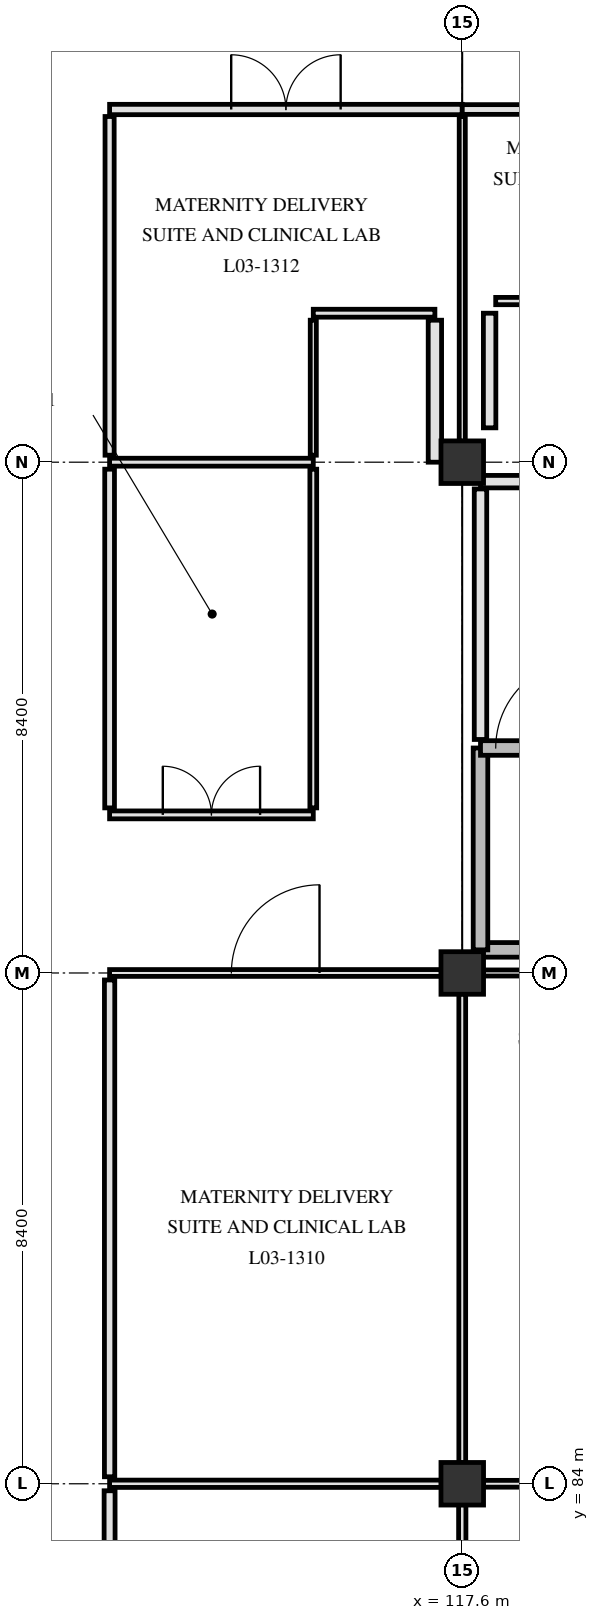
"""IFC4 building model, lengths in metres.
Left out: names, types, materials, properties, quantities, classifications, styles, units other than length and angle.
Written with IfcOpenShell. Run it as: python <this file> out.ifc"""

import sys

from ifc_helpers import new_model, si_unit, direction, frame, frame_2d, origin, origin_2d, place, context, subcontext, project, spatial, rectangle, extrude, element, fill, save


model = new_model("IFC4")
c1 = context("Model", 3, precision=1e-05, world=origin(), true_north=direction((0.0, 1.0)))
c2 = subcontext(c1, "Body", "Model", "MODEL_VIEW")
j1 = project(units=[si_unit("LENGTHUNIT", "METRE"), si_unit("PLANEANGLEUNIT", "RADIAN")], contexts=[c1])
p1 = place(None, origin())
s1 = spatial("IfcSite", under=j1, at=p1, CompositionType="ELEMENT")
p2 = place(p1, origin())
s2 = spatial("IfcBuilding", under=s1, at=p2, CompositionType="ELEMENT")
p3 = place(p2, frame((0.0, 0.0, 14.4)))
s3 = spatial("IfcBuildingStorey", under=s2, at=p3, CompositionType="ELEMENT", Elevation=14.4)
for number, where, z_axis, x_axis in (
    (1, (117.6, 84.0, 0.0), (0.0, 0.0, 1.0), (1.0, 0.0, 0.0)),
    (2, (117.6, 92.4, 0.0), (0.0, 0.0, 1.0), (1.0, 0.0, 0.0)),
    (3, (117.6, 100.8, 0.0), (0.0, 0.0, 1.0), (1.0, 0.0, 0.0)),
):
    element("IfcColumn", number, at=place(p3, frame(where, z_axis=z_axis, x_axis=x_axis)), inside=s3, PredefinedType="COLUMN", context=c2, shape_type="SweptSolid", body=[
        extrude(rectangle(XDim=0.7, YDim=0.7, at=origin_2d()), origin(), (0.0, 0.0, 1.0), 4.2),
    ])
p4 = place(p3, frame((117.9, 92.78, 0.0), z_axis=(0.0, 0.0, 1.0), x_axis=(1.0, 0.0, 0.0)))
e4 = element("IfcWall", 4, at=p4, inside=s3, PredefinedType="SHEAR", context=c2, shape_type="SweptSolid", body=[
    extrude(rectangle(XDim=7.82, YDim=0.24, at=frame_2d((3.91, 0.0))), origin(), (0.0, 0.0, 1.0), 3.9),
])
p5 = place(p3, frame((117.9, 92.78, 0.0), z_axis=(0.0, 0.0, 1.0), x_axis=(0.0, 1.0, 0.0)))
e5 = element("IfcWall", 5, at=p5, inside=s3, PredefinedType="SHEAR", context=c2, shape_type="SweptSolid", body=[
    extrude(rectangle(XDim=3.32, YDim=0.24, at=frame_2d((1.66, 0.0))), origin(), (0.0, 0.0, 1.0), 3.9),
])
p6 = place(p3, frame((117.9, 96.1, 0.0), z_axis=(0.0, 0.0, 1.0), x_axis=(1.0, 0.0, 0.0)))
e6 = element("IfcWall", 6, at=p6, inside=s3, PredefinedType="SHEAR", context=c2, shape_type="SweptSolid", body=[
    extrude(rectangle(XDim=7.82, YDim=0.24, at=frame_2d((3.91, 0.0))), origin(), (0.0, 0.0, 1.0), 3.9),
])
p7 = place(p6, frame((0.25, 0.0, 0.0)))
e7 = element("IfcOpeningElement", 7, at=p7, cuts=e6, PredefinedType="OPENING", context=c2, shape_type="SweptSolid", body=[
    extrude(rectangle(XDim=1.45, YDim=2.2, at=frame_2d((0.725, 1.1))), frame((0.0, 0.13, 0.0), z_axis=(0.0, -1.0, 0.0), x_axis=(1.0, 0.0, 0.0)), (0.0, 0.0, 1.0), 0.26),
])
p8 = place(p3, frame((117.9, 96.24, 0.0), z_axis=(0.0, 0.0, 1.0), x_axis=(0.0, 1.0, 0.0)))
e8 = element("IfcWall", 8, at=p8, inside=s3, PredefinedType="PARTITIONING", context=c2, shape_type="SweptSolid", body=[
    extrude(rectangle(XDim=4.12, YDim=0.205, at=frame_2d((2.06, 0.0))), origin(), (0.0, 0.0, 1.0), 3.34),
])
p9 = place(p3, frame((117.9, 100.48, 0.0), z_axis=(0.0, 0.0, 1.0), x_axis=(1.0, 0.0, 0.0)))
e9 = element("IfcWall", 9, at=p9, inside=s3, PredefinedType="PARTITIONING", context=c2, shape_type="SweptSolid", body=[
    extrude(rectangle(XDim=4.18, YDim=0.205, at=frame_2d((2.09, 0.0))), origin(), (0.0, 0.0, 1.0), 3.29),
])
p10 = place(p9, frame((1.29, 0.0, 0.0)))
e10 = element("IfcOpeningElement", 10, at=p10, cuts=e9, PredefinedType="OPENING", context=c2, shape_type="SweptSolid", body=[
    extrude(rectangle(XDim=1.6, YDim=2.25, at=frame_2d((0.8, 1.125))), frame((0.0, 0.113, 0.0), z_axis=(0.0, -1.0, 0.0), x_axis=(1.0, 0.0, 0.0)), (0.0, 0.0, 1.0), 0.225),
])
p11 = place(p3, frame((111.8, 84.0, 0.0), z_axis=(0.0, 0.0, 1.0), x_axis=(1.0, 0.0, 0.0)))
e11 = element("IfcWall", 11, at=p11, inside=s3, PredefinedType="PARTITIONING", context=c2, shape_type="SweptSolid", body=[
    extrude(rectangle(XDim=5.455, YDim=0.12, at=frame_2d((2.728, 0.0))), origin(), (0.0, 0.0, 1.0), 3.29),
])
p12 = place(p3, frame((117.945, 84.0, 0.0), z_axis=(0.0, 0.0, 1.0), x_axis=(1.0, 0.0, 0.0)))
e12 = element("IfcWall", 12, at=p12, inside=s3, PredefinedType="PARTITIONING", context=c2, shape_type="SweptSolid", body=[
    extrude(rectangle(XDim=5.605, YDim=0.112, at=frame_2d((2.802, 0.0))), origin(), (0.0, 0.0, 1.0), 3.29),
])
p13 = place(p3, frame((111.8, 92.4, 0.0), z_axis=(0.0, 0.0, 1.0), x_axis=(1.0, 0.0, 0.0)))
e13 = element("IfcWall", 13, at=p13, inside=s3, PredefinedType="PARTITIONING", context=c2, shape_type="SweptSolid", body=[
    extrude(rectangle(XDim=5.455, YDim=0.112, at=frame_2d((2.728, 0.0))), origin(), (0.0, 0.0, 1.0), 2.89),
])
p14 = place(p13, frame((2.002, 0.0, 0.0)))
e14 = element("IfcOpeningElement", 14, at=p14, cuts=e13, PredefinedType="OPENING", context=c2, shape_type="SweptSolid", body=[
    extrude(rectangle(XDim=1.45, YDim=2.2, at=frame_2d((0.725, 1.1))), frame((0.0, 0.066, 0.0), z_axis=(0.0, -1.0, 0.0), x_axis=(1.0, 0.0, 0.0)), (0.0, 0.0, 1.0), 0.132),
])
p15 = place(p3, frame((117.945, 92.4, 0.0), z_axis=(0.0, 0.0, 1.0), x_axis=(1.0, 0.0, 0.0)))
e15 = element("IfcWall", 15, at=p15, inside=s3, PredefinedType="PARTITIONING", context=c2, shape_type="SweptSolid", body=[
    extrude(rectangle(XDim=7.71, YDim=0.1, at=frame_2d((3.855, 0.0))), origin(), (0.0, 0.0, 1.0), 2.89),
])
p16 = place(p3, frame((111.8, 95.0, 0.0), z_axis=(0.0, 0.0, 1.0), x_axis=(1.0, 0.0, 0.0)))
e16 = element("IfcWall", 16, at=p16, inside=s3, PredefinedType="PARTITIONING", context=c2, shape_type="SweptSolid", body=[
    extrude(rectangle(XDim=3.35, YDim=0.13, at=frame_2d((1.675, 0.0))), origin(), (0.0, 0.0, 1.0), 3.89),
])
p17 = place(p16, frame((0.875, 0.0, 0.0)))
e17 = element("IfcOpeningElement", 17, at=p17, cuts=e16, PredefinedType="OPENING", context=c2, shape_type="SweptSolid", body=[
    extrude(rectangle(XDim=1.6, YDim=2.25, at=frame_2d((0.8, 1.125))), frame((0.0, 0.075, 0.0), z_axis=(0.0, -1.0, 0.0), x_axis=(1.0, 0.0, 0.0)), (0.0, 0.0, 1.0), 0.15),
])
p18 = place(p3, frame((111.8, 100.8, 0.0), z_axis=(0.0, 0.0, 1.0), x_axis=(1.0, 0.0, 0.0)))
e18 = element("IfcWall", 18, at=p18, inside=s3, PredefinedType="PARTITIONING", context=c2, shape_type="SweptSolid", body=[
    extrude(rectangle(XDim=3.35, YDim=0.13, at=frame_2d((1.675, 0.0))), origin(), (0.0, 0.0, 1.0), 3.29),
])
p19 = place(p3, frame((115.15, 103.25, 0.0), z_axis=(0.0, 0.0, 1.0), x_axis=(1.0, 0.0, 0.0)))
e19 = element("IfcWall", 19, at=p19, inside=s3, PredefinedType="PARTITIONING", context=c2, shape_type="SweptSolid", body=[
    extrude(rectangle(XDim=2.0, YDim=0.13, at=frame_2d((1.0, 0.0))), origin(), (0.0, 0.0, 1.0), 3.89),
])
p20 = place(p3, frame((118.15, 103.45, 0.0), z_axis=(0.0, 0.0, 1.0), x_axis=(1.0, 0.0, 0.0)))
e20 = element("IfcWall", 20, at=p20, inside=s3, PredefinedType="PARTITIONING", context=c2, shape_type="SweptSolid", body=[
    extrude(rectangle(XDim=7.85, YDim=0.12, at=frame_2d((3.925, 0.0))), origin(), (0.0, 0.0, 1.0), 2.69),
])
p21 = place(p20, frame((3.005, 0.0, 0.0)))
e21 = element("IfcOpeningElement", 21, at=p21, cuts=e20, PredefinedType="OPENING", context=c2, shape_type="SweptSolid", body=[
    extrude(rectangle(XDim=1.84, YDim=2.28, at=frame_2d((0.92, 1.14))), frame((0.0, 0.07, 0.0), z_axis=(0.0, -1.0, 0.0), x_axis=(1.0, 0.0, 0.0)), (0.0, 0.0, 1.0), 0.14),
])
p22 = place(p3, frame((111.8, 106.6, 0.0), z_axis=(0.0, 0.0, 1.0), x_axis=(1.0, 0.0, 0.0)))
e22 = element("IfcWall", 22, at=p22, inside=s3, PredefinedType="PARTITIONING", context=c2, shape_type="SweptSolid", body=[
    extrude(rectangle(XDim=5.8, YDim=0.17, at=frame_2d((2.9, 0.0))), origin(), (0.0, 0.0, 1.0), 3.34),
])
p23 = place(p22, frame((2.0, 0.0, 0.0)))
e23 = element("IfcOpeningElement", 23, at=p23, cuts=e22, PredefinedType="OPENING", context=c2, shape_type="SweptSolid", body=[
    extrude(rectangle(XDim=1.8, YDim=2.25, at=frame_2d((0.9, 1.125))), frame((0.0, 0.095, 0.0), z_axis=(0.0, -1.0, 0.0), x_axis=(1.0, 0.0, 0.0)), (0.0, 0.0, 1.0), 0.19),
])
p24 = place(p3, frame((117.6, 106.6, 0.0), z_axis=(0.0, 0.0, 1.0), x_axis=(1.0, 0.0, 0.0)))
e24 = element("IfcWall", 24, at=p24, inside=s3, PredefinedType="PARTITIONING", context=c2, shape_type="SweptSolid", body=[
    extrude(rectangle(XDim=8.4, YDim=0.16, at=frame_2d((4.2, 0.0))), origin(), (0.0, 0.0, 1.0), 2.69),
])
p25 = place(p3, frame((111.8, 78.315, 0.0), z_axis=(0.0, 0.0, 1.0), x_axis=(0.0, 1.0, 0.0)))
e25 = element("IfcWall", 25, at=p25, inside=s3, PredefinedType="PARTITIONING", context=c2, shape_type="SweptSolid", body=[
    extrude(rectangle(XDim=5.57, YDim=0.18, at=frame_2d((2.785, 0.0))), origin(), (0.0, 0.0, 1.0), 3.29),
])
p26 = place(p3, frame((111.8, 84.115, 0.0), z_axis=(0.0, 0.0, 1.0), x_axis=(0.0, 1.0, 0.0)))
e26 = element("IfcWall", 26, at=p26, inside=s3, PredefinedType="PARTITIONING", context=c2, shape_type="SweptSolid", body=[
    extrude(rectangle(XDim=8.17, YDim=0.17, at=frame_2d((4.085, 0.0))), origin(), (0.0, 0.0, 1.0), 2.89),
])
p27 = place(p3, frame((111.8, 95.115, 0.0), z_axis=(0.0, 0.0, 1.0), x_axis=(0.0, 1.0, 0.0)))
e27 = element("IfcWall", 27, at=p27, inside=s3, PredefinedType="PARTITIONING", context=c2, shape_type="SweptSolid", body=[
    extrude(rectangle(XDim=5.57, YDim=0.16, at=frame_2d((2.785, 0.0))), origin(), (0.0, 0.0, 1.0), 3.29),
])
p28 = place(p3, frame((111.8, 100.915, 0.0), z_axis=(0.0, 0.0, 1.0), x_axis=(0.0, 1.0, 0.0)))
e28 = element("IfcWall", 28, at=p28, inside=s3, PredefinedType="PARTITIONING", context=c2, shape_type="SweptSolid", body=[
    extrude(rectangle(XDim=5.57, YDim=0.15, at=frame_2d((2.785, 0.0))), origin(), (0.0, 0.0, 1.0), 3.29),
])
p29 = place(p3, frame((115.15, 95.115, 0.0), z_axis=(0.0, 0.0, 1.0), x_axis=(0.0, 1.0, 0.0)))
e29 = element("IfcWall", 29, at=p29, inside=s3, PredefinedType="PARTITIONING", context=c2, shape_type="SweptSolid", body=[
    extrude(rectangle(XDim=5.57, YDim=0.112, at=frame_2d((2.785, 0.0))), origin(), (0.0, 0.0, 1.0), 3.29),
])
p30 = place(p3, frame((115.15, 100.915, 0.0), z_axis=(0.0, 0.0, 1.0), x_axis=(0.0, 1.0, 0.0)))
e30 = element("IfcWall", 30, at=p30, inside=s3, PredefinedType="PARTITIONING", context=c2, shape_type="SweptSolid", body=[
    extrude(rectangle(XDim=2.22, YDim=0.1, at=frame_2d((1.11, 0.0))), origin(), (0.0, 0.0, 1.0), 3.29),
])
p31 = place(p3, frame((117.15, 100.8, 0.0), z_axis=(0.0, 0.0, 1.0), x_axis=(0.0, 1.0, 0.0)))
e31 = element("IfcWall", 31, at=p31, inside=s3, PredefinedType="PARTITIONING", context=c2, shape_type="SweptSolid", body=[
    extrude(rectangle(XDim=2.335, YDim=0.22, at=frame_2d((1.167, 0.0))), origin(), (0.0, 0.0, 1.0), 3.29),
])
p32 = place(p3, frame((117.6, 78.315, 0.0), z_axis=(0.0, 0.0, 1.0), x_axis=(0.0, 1.0, 0.0)))
e32 = element("IfcWall", 32, at=p32, inside=s3, PredefinedType="PARTITIONING", context=c2, shape_type="SweptSolid", body=[
    extrude(rectangle(XDim=5.34, YDim=0.12, at=frame_2d((2.67, 0.0))), origin(), (0.0, 0.0, 1.0), 3.34),
])
p33 = place(p3, frame((117.6, 84.345, 0.0), z_axis=(0.0, 0.0, 1.0), x_axis=(0.0, 1.0, 0.0)))
e33 = element("IfcWall", 33, at=p33, inside=s3, PredefinedType="PARTITIONING", context=c2, shape_type="SweptSolid", body=[
    extrude(rectangle(XDim=7.71, YDim=0.112, at=frame_2d((3.855, 0.0))), origin(), (0.0, 0.0, 1.0), 3.34),
])
p34 = place(p3, frame((117.6, 101.145, 0.0), z_axis=(0.0, 0.0, 1.0), x_axis=(0.0, 1.0, 0.0)))
e34 = element("IfcWall", 34, at=p34, inside=s3, PredefinedType="PARTITIONING", context=c2, shape_type="SweptSolid", body=[
    extrude(rectangle(XDim=5.34, YDim=0.1, at=frame_2d((2.67, 0.0))), origin(), (0.0, 0.0, 1.0), 3.34),
])
p35 = place(p3, frame((118.05, 101.365, 0.0), z_axis=(0.0, 0.0, 1.0), x_axis=(0.0, 1.0, 0.0)))
e35 = element("IfcWall", 35, at=p35, inside=s3, PredefinedType="PARTITIONING", context=c2, shape_type="SweptSolid", body=[
    extrude(rectangle(XDim=1.885, YDim=0.205, at=frame_2d((0.942, 0.0))), origin(), (0.0, 0.0, 1.0), 3.89),
])
p36 = place(p7, origin())
e36 = element("IfcDoor", 36, at=p36, inside=s3, OperationType="SINGLE_SWING_RIGHT", PredefinedType="DOOR", context=c2, shape_type="SweptSolid", body=[
    extrude(rectangle(XDim=1.45, YDim=2.2, at=frame_2d((0.725, 1.1))), frame((0.0, 0.025, 0.0), z_axis=(0.0, -1.0, 0.0), x_axis=(1.0, 0.0, 0.0)), (0.0, 0.0, 1.0), 0.05),
])
fill(e7, e36)
p37 = place(p14, origin())
e37 = element("IfcDoor", 37, at=p37, inside=s3, OperationType="SINGLE_SWING_RIGHT", PredefinedType="DOOR", context=c2, shape_type="SweptSolid", body=[
    extrude(rectangle(XDim=1.45, YDim=2.2, at=frame_2d((0.725, 1.1))), frame((0.0, 0.025, 0.0), z_axis=(0.0, -1.0, 0.0), x_axis=(1.0, 0.0, 0.0)), (0.0, 0.0, 1.0), 0.05),
])
fill(e14, e37)
p38 = place(p17, origin())
e38 = element("IfcDoor", 38, at=p38, inside=s3, OperationType="DOUBLE_SWING_LEFT", PredefinedType="DOOR", context=c2, shape_type="SweptSolid", body=[
    extrude(rectangle(XDim=1.6, YDim=2.25, at=frame_2d((0.8, 1.125))), frame((0.0, 0.025, 0.0), z_axis=(0.0, -1.0, 0.0), x_axis=(1.0, 0.0, 0.0)), (0.0, 0.0, 1.0), 0.05),
])
fill(e17, e38)
p39 = place(p23, origin())
e39 = element("IfcDoor", 39, at=p39, inside=s3, OperationType="DOUBLE_SWING_RIGHT", PredefinedType="DOOR", context=c2, shape_type="SweptSolid", body=[
    extrude(rectangle(XDim=1.8, YDim=2.25, at=frame_2d((0.9, 1.125))), frame((0.0, 0.025, 0.0), z_axis=(0.0, -1.0, 0.0), x_axis=(1.0, 0.0, 0.0)), (0.0, 0.0, 1.0), 0.05),
])
fill(e23, e39)
save(model, sys.argv[1])
